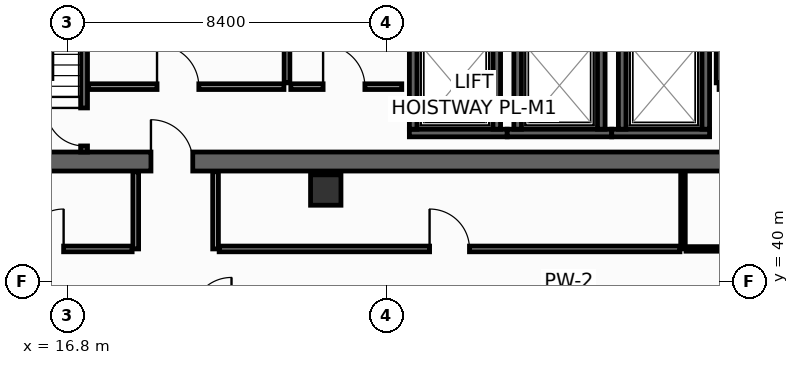
"""IFC4 building model, lengths in metres.
Left out: names, types, materials, properties, quantities, classifications, styles, units other than length and angle.
Written with IfcOpenShell. Run it as: python <this file> out.ifc"""

import sys

from ifc_helpers import new_model, si_unit, direction, frame, frame_2d, origin, origin_2d, place, context, subcontext, project, spatial, rectangle, hollow_rectangle, extrude, element, fill, save


model = new_model("IFC4")
c1 = context("Model", 3, precision=1e-05, world=origin(), true_north=direction((0.0, 1.0)))
c2 = subcontext(c1, "Body", "Model", "MODEL_VIEW")
j1 = project(units=[si_unit("LENGTHUNIT", "METRE"), si_unit("PLANEANGLEUNIT", "RADIAN")], contexts=[c1])
p1 = place(None, origin())
s1 = spatial("IfcSite", under=j1, at=p1, CompositionType="ELEMENT")
p2 = place(p1, origin())
s2 = spatial("IfcBuilding", under=s1, at=p2, CompositionType="ELEMENT")
p3 = place(p2, frame((0.0, 0.0, 205.6)))
s3 = spatial("IfcBuildingStorey", under=s2, at=p3, CompositionType="ELEMENT", Elevation=205.6)
p4 = place(p3, frame((13.6, 43.15, 0.0), z_axis=(0.0, 0.0, 1.0), x_axis=(1.0, 0.0, 0.0)))
e1 = element("IfcWall", 1, at=p4, inside=s3, PredefinedType="SHEAR", context=c2, shape_type="SweptSolid", body=[
    extrude(rectangle(XDim=32.7, YDim=0.5, at=frame_2d((16.35, 0.0))), origin(), (0.0, 0.0, 1.0), 3.55),
])
p5 = place(p4, frame((5.4, 0.0, 0.0)))
e2 = element("IfcOpeningElement", 2, at=p5, cuts=e1, PredefinedType="OPENING", context=c2, shape_type="SweptSolid", body=[
    extrude(rectangle(XDim=1.1, YDim=2.15, at=frame_2d((0.55, 1.075))), frame((0.0, 0.26, 0.0), z_axis=(0.0, -1.0, 0.0), x_axis=(1.0, 0.0, 0.0)), (0.0, 0.0, 1.0), 0.52),
])
p6 = place(p4, frame((25.6, 0.0, 0.0)))
e3 = element("IfcOpeningElement", 3, at=p6, cuts=e1, PredefinedType="OPENING", context=c2, shape_type="SweptSolid", body=[
    extrude(rectangle(XDim=1.1, YDim=2.15, at=frame_2d((0.55, 1.075))), frame((0.0, 0.26, 0.0), z_axis=(0.0, -1.0, 0.0), x_axis=(1.0, 0.0, 0.0)), (0.0, 0.0, 1.0), 0.52),
])
p7 = place(p3, frame((23.6, 42.4, 0.0), z_axis=(0.0, 0.0, 1.0), x_axis=(1.0, 0.0, 0.0)))
e4 = element("IfcColumn", 4, at=p7, inside=s3, PredefinedType="COLUMN", context=c2, shape_type="SweptSolid", body=[
    extrude(hollow_rectangle(XDim=0.8, YDim=0.8, WallThickness=0.036, at=origin_2d()), origin(), (0.0, 0.0, 1.0), 3.8),
])
p8 = place(p3, frame((25.8, 43.9, 0.0), z_axis=(0.0, 0.0, 1.0), x_axis=(1.0, 0.0, 0.0)))
e5 = element("IfcWall", 5, at=p8, inside=s3, PredefinedType="SHEAR", context=c2, shape_type="SweptSolid", body=[
    extrude(rectangle(XDim=2.575, YDim=0.2, at=frame_2d((1.288, 0.0))), origin(), (0.0, 0.0, 1.0), 3.55),
])
for number, where, z_axis, x_axis in (
    (6, (25.9, 44.0, 0.0), (0.0, 0.0, 1.0), (0.0, 1.0, 0.0)),
    (7, (28.1, 44.0, 0.0), (0.0, 0.0, 1.0), (0.0, 1.0, 0.0)),
):
    element("IfcWall", number, at=place(p3, frame(where, z_axis=z_axis, x_axis=x_axis)), inside=s3, PredefinedType="SHEAR", context=c2, shape_type="SweptSolid", body=[
        extrude(rectangle(XDim=2.3, YDim=0.2, at=frame_2d((1.15, 0.0))), origin(), (0.0, 0.0, 1.0), 3.55),
    ])
p9 = place(p3, frame((28.375, 43.9, 0.0), z_axis=(0.0, 0.0, 1.0), x_axis=(1.0, 0.0, 0.0)))
e8 = element("IfcWall", 8, at=p9, inside=s3, PredefinedType="SHEAR", context=c2, shape_type="SweptSolid", body=[
    extrude(rectangle(XDim=2.75, YDim=0.2, at=frame_2d((1.375, 0.0))), origin(), (0.0, 0.0, 1.0), 3.55),
])
for number, where, z_axis, x_axis in (
    (9, (28.65, 44.0, 0.0), (0.0, 0.0, 1.0), (0.0, 1.0, 0.0)),
    (10, (30.85, 44.0, 0.0), (0.0, 0.0, 1.0), (0.0, 1.0, 0.0)),
):
    element("IfcWall", number, at=place(p3, frame(where, z_axis=z_axis, x_axis=x_axis)), inside=s3, PredefinedType="SHEAR", context=c2, shape_type="SweptSolid", body=[
        extrude(rectangle(XDim=2.3, YDim=0.2, at=frame_2d((1.15, 0.0))), origin(), (0.0, 0.0, 1.0), 3.55),
    ])
p10 = place(p3, frame((31.125, 43.9, 0.0), z_axis=(0.0, 0.0, 1.0), x_axis=(1.0, 0.0, 0.0)))
e11 = element("IfcWall", 11, at=p10, inside=s3, PredefinedType="SHEAR", context=c2, shape_type="SweptSolid", body=[
    extrude(rectangle(XDim=2.575, YDim=0.2, at=frame_2d((1.288, 0.0))), origin(), (0.0, 0.0, 1.0), 3.55),
])
for number, where, z_axis, x_axis in (
    (12, (31.4, 44.0, 0.0), (0.0, 0.0, 1.0), (0.0, 1.0, 0.0)),
    (13, (33.6, 44.0, 0.0), (0.0, 0.0, 1.0), (0.0, 1.0, 0.0)),
):
    element("IfcWall", number, at=place(p3, frame(where, z_axis=z_axis, x_axis=x_axis)), inside=s3, PredefinedType="SHEAR", context=c2, shape_type="SweptSolid", body=[
        extrude(rectangle(XDim=2.3, YDim=0.2, at=frame_2d((1.15, 0.0))), origin(), (0.0, 0.0, 1.0), 3.55),
    ])
p11 = place(p3, frame((17.24, 43.4, 0.0), z_axis=(0.0, 0.0, 1.0), x_axis=(0.0, 1.0, 0.0)))
e14 = element("IfcWall", 14, at=p11, inside=s3, PredefinedType="SHEAR", context=c2, shape_type="SweptSolid", body=[
    extrude(rectangle(XDim=10.4, YDim=0.18, at=frame_2d((5.2, 0.0))), origin(), (0.0, 0.0, 1.0), 3.55),
])
p12 = place(p11, frame((0.16, 0.0, 0.0)))
e15 = element("IfcOpeningElement", 15, at=p12, cuts=e14, PredefinedType="OPENING", context=c2, shape_type="SweptSolid", body=[
    extrude(rectangle(XDim=1.0, YDim=2.15, at=frame_2d((0.5, 1.075))), frame((0.0, 0.1, 0.0), z_axis=(0.0, -1.0, 0.0), x_axis=(1.0, 0.0, 0.0)), (0.0, 0.0, 1.0), 0.2),
])
p13 = place(p3, frame((17.36, 45.12, 0.0), z_axis=(0.0, 0.0, 1.0), x_axis=(1.0, 0.0, 0.0)))
e16 = element("IfcWall", 16, at=p13, inside=s3, PredefinedType="PARTITIONING", context=c2, shape_type="SweptSolid", body=[
    extrude(rectangle(XDim=5.14, YDim=0.15, at=frame_2d((2.57, 0.0))), origin(), (0.0, 0.0, 1.0), 3.55),
])
p14 = place(p13, frame((1.8, 0.0, 0.0)))
e17 = element("IfcOpeningElement", 17, at=p14, cuts=e16, PredefinedType="OPENING", context=c2, shape_type="SweptSolid", body=[
    extrude(rectangle(XDim=1.1, YDim=2.15, at=frame_2d((0.55, 1.075))), frame((0.0, 0.085, 0.0), z_axis=(0.0, -1.0, 0.0), x_axis=(1.0, 0.0, 0.0)), (0.0, 0.0, 1.0), 0.17),
])
p15 = place(p3, frame((22.58, 50.55, 0.0), z_axis=(0.0, 0.0, 1.0), x_axis=(0.0, -1.0, 0.0)))
e18 = element("IfcWall", 18, at=p15, inside=s3, PredefinedType="PARTITIONING", context=c2, shape_type="SweptSolid", body=[
    extrude(rectangle(XDim=5.33, YDim=0.15, at=frame_2d((2.665, 0.0))), origin(), (0.0, 0.0, 1.0), 3.55),
])
p16 = place(p15, frame((1.8, 0.0, 0.0)))
e19 = element("IfcOpeningElement", 19, at=p16, cuts=e18, PredefinedType="OPENING", context=c2, shape_type="SweptSolid", body=[
    extrude(rectangle(XDim=1.1, YDim=2.15, at=frame_2d((0.55, 1.075))), frame((0.0, 0.085, 0.0), z_axis=(0.0, -1.0, 0.0), x_axis=(1.0, 0.0, 0.0)), (0.0, 0.0, 1.0), 0.17),
])
p17 = place(p3, frame((22.68, 45.12, 0.0), z_axis=(0.0, 0.0, 1.0), x_axis=(1.0, 0.0, 0.0)))
e20 = element("IfcWall", 20, at=p17, inside=s3, PredefinedType="PARTITIONING", context=c2, shape_type="SweptSolid", body=[
    extrude(rectangle(XDim=2.92, YDim=0.15, at=frame_2d((1.46, 0.0))), origin(), (0.0, 0.0, 1.0), 3.55),
])
p18 = place(p17, frame((0.85, 0.0, 0.0)))
e21 = element("IfcOpeningElement", 21, at=p18, cuts=e20, PredefinedType="OPENING", context=c2, shape_type="SweptSolid", body=[
    extrude(rectangle(XDim=1.1, YDim=2.15, at=frame_2d((0.55, 1.075))), frame((0.0, 0.085, 0.0), z_axis=(0.0, -1.0, 0.0), x_axis=(1.0, 0.0, 0.0)), (0.0, 0.0, 1.0), 0.17),
])
p19 = place(p3, frame((33.95, 45.12, 0.0), z_axis=(0.0, 0.0, 1.0), x_axis=(1.0, 0.0, 0.0)))
e22 = element("IfcWall", 22, at=p19, inside=s3, PredefinedType="PARTITIONING", context=c2, shape_type="SweptSolid", body=[
    extrude(rectangle(XDim=8.55, YDim=0.15, at=frame_2d((4.275, 0.0))), origin(), (0.0, 0.0, 1.0), 3.55),
])
p20 = place(p19, frame((0.95, 0.0, 0.0)))
e23 = element("IfcOpeningElement", 23, at=p20, cuts=e22, PredefinedType="OPENING", context=c2, shape_type="SweptSolid", body=[
    extrude(rectangle(XDim=0.95, YDim=2.15, at=frame_2d((0.475, 1.075))), frame((0.0, 0.085, 0.0), z_axis=(0.0, -1.0, 0.0), x_axis=(1.0, 0.0, 0.0)), (0.0, 0.0, 1.0), 0.17),
])
p21 = place(p19, frame((3.8, 0.0, 0.0)))
e24 = element("IfcOpeningElement", 24, at=p21, cuts=e22, PredefinedType="OPENING", context=c2, shape_type="SweptSolid", body=[
    extrude(rectangle(XDim=0.95, YDim=2.15, at=frame_2d((0.475, 1.075))), frame((0.0, 0.085, 0.0), z_axis=(0.0, -1.0, 0.0), x_axis=(1.0, 0.0, 0.0)), (0.0, 0.0, 1.0), 0.17),
])
p22 = place(p19, frame((6.65, 0.0, 0.0)))
e25 = element("IfcOpeningElement", 25, at=p22, cuts=e22, PredefinedType="OPENING", context=c2, shape_type="SweptSolid", body=[
    extrude(rectangle(XDim=0.95, YDim=2.15, at=frame_2d((0.475, 1.075))), frame((0.0, 0.085, 0.0), z_axis=(0.0, -1.0, 0.0), x_axis=(1.0, 0.0, 0.0)), (0.0, 0.0, 1.0), 0.17),
])
p23 = place(p3, frame((33.95, 45.22, 0.0), z_axis=(0.0, 0.0, 1.0), x_axis=(0.0, 1.0, 0.0)))
e26 = element("IfcWall", 26, at=p23, inside=s3, PredefinedType="PARTITIONING", context=c2, shape_type="SweptSolid", body=[
    extrude(rectangle(XDim=2.33, YDim=0.15, at=frame_2d((1.165, 0.0))), origin(), (0.0, 0.0, 1.0), 3.55),
])
for number, where, z_axis, x_axis in (
    (27, (18.6, 40.85, 0.0), (0.0, 0.0, 1.0), (0.0, 1.0, 0.0)),
    (28, (20.7, 40.85, 0.0), (0.0, 0.0, 1.0), (0.0, 1.0, 0.0)),
):
    element("IfcWall", number, at=place(p3, frame(where, z_axis=z_axis, x_axis=x_axis)), inside=s3, PredefinedType="PARTITIONING", context=c2, shape_type="SweptSolid", body=[
        extrude(rectangle(XDim=2.03, YDim=0.15, at=frame_2d((1.015, 0.0))), origin(), (0.0, 0.0, 1.0), 3.55),
    ])
p24 = place(p3, frame((13.85, 40.85, 0.0), z_axis=(0.0, 0.0, 1.0), x_axis=(1.0, 0.0, 0.0)))
e29 = element("IfcWall", 29, at=p24, inside=s3, PredefinedType="PARTITIONING", context=c2, shape_type="SweptSolid", body=[
    extrude(rectangle(XDim=4.655, YDim=0.15, at=frame_2d((2.327, 0.0))), origin(), (0.0, 0.0, 1.0), 3.55),
])
p25 = place(p24, frame((1.802, 0.0, 0.0)))
e30 = element("IfcOpeningElement", 30, at=p25, cuts=e29, PredefinedType="OPENING", context=c2, shape_type="SweptSolid", body=[
    extrude(rectangle(XDim=1.05, YDim=2.15, at=frame_2d((0.525, 1.075))), frame((0.0, 0.085, 0.0), z_axis=(0.0, -1.0, 0.0), x_axis=(1.0, 0.0, 0.0)), (0.0, 0.0, 1.0), 0.17),
])
p26 = place(p3, frame((33.0, 40.85, 0.0), z_axis=(0.0, 0.0, 1.0), x_axis=(0.0, 1.0, 0.0)))
e31 = element("IfcWall", 31, at=p26, inside=s3, PredefinedType="PARTITIONING", context=c2, shape_type="SweptSolid", body=[
    extrude(rectangle(XDim=2.03, YDim=0.12, at=frame_2d((1.015, 0.0))), origin(), (0.0, 0.0, 1.0), 2.835),
])
p27 = place(p3, frame((20.795, 40.85, 0.0), z_axis=(0.0, 0.0, 1.0), x_axis=(1.0, 0.0, 0.0)))
e32 = element("IfcWall", 32, at=p27, inside=s3, PredefinedType="PARTITIONING", context=c2, shape_type="SweptSolid", body=[
    extrude(rectangle(XDim=12.125, YDim=0.15, at=frame_2d((6.062, 0.0))), origin(), (0.0, 0.0, 1.0), 2.835),
])
p28 = place(p27, frame((5.537, 0.0, 0.0)))
e33 = element("IfcOpeningElement", 33, at=p28, cuts=e32, PredefinedType="OPENING", context=c2, shape_type="SweptSolid", body=[
    extrude(rectangle(XDim=1.05, YDim=2.15, at=frame_2d((0.525, 1.075))), frame((0.0, 0.085, 0.0), z_axis=(0.0, -1.0, 0.0), x_axis=(1.0, 0.0, 0.0)), (0.0, 0.0, 1.0), 0.17),
])
p29 = place(p3, frame((33.08, 40.85, 0.0), z_axis=(0.0, 0.0, 1.0), x_axis=(1.0, 0.0, 0.0)))
e34 = element("IfcWall", 34, at=p29, inside=s3, PredefinedType="PARTITIONING", context=c2, shape_type="SweptSolid", body=[
    extrude(rectangle(XDim=5.625, YDim=0.12, at=frame_2d((2.812, 0.0))), origin(), (0.0, 0.0, 1.0), 2.835),
])
p30 = place(p29, frame((1.702, 0.0, 0.0)))
e35 = element("IfcOpeningElement", 35, at=p30, cuts=e34, PredefinedType="OPENING", context=c2, shape_type="SweptSolid", body=[
    extrude(rectangle(XDim=0.9, YDim=2.1, at=frame_2d((0.45, 1.05))), frame((0.0, 0.07, 0.0), z_axis=(0.0, -1.0, 0.0), x_axis=(1.0, 0.0, 0.0)), (0.0, 0.0, 1.0), 0.14),
])
p31 = place(p12, origin())
e36 = element("IfcDoor", 36, at=p31, inside=s3, OperationType="SINGLE_SWING_RIGHT", PredefinedType="DOOR", context=c2, shape_type="SweptSolid", body=[
    extrude(rectangle(XDim=1.0, YDim=2.15, at=frame_2d((0.5, 1.075))), frame((0.0, 0.025, 0.0), z_axis=(0.0, -1.0, 0.0), x_axis=(1.0, 0.0, 0.0)), (0.0, 0.0, 1.0), 0.05),
])
fill(e15, e36)
p32 = place(p14, origin())
e37 = element("IfcDoor", 37, at=p32, inside=s3, OperationType="SINGLE_SWING_LEFT", PredefinedType="DOOR", context=c2, shape_type="SweptSolid", body=[
    extrude(rectangle(XDim=1.1, YDim=2.15, at=frame_2d((0.55, 1.075))), frame((0.0, 0.025, 0.0), z_axis=(0.0, -1.0, 0.0), x_axis=(1.0, 0.0, 0.0)), (0.0, 0.0, 1.0), 0.05),
])
fill(e17, e37)
p33 = place(p18, origin())
e38 = element("IfcDoor", 38, at=p33, inside=s3, OperationType="SINGLE_SWING_LEFT", PredefinedType="DOOR", context=c2, shape_type="SweptSolid", body=[
    extrude(rectangle(XDim=1.1, YDim=2.15, at=frame_2d((0.55, 1.075))), frame((0.0, 0.025, 0.0), z_axis=(0.0, -1.0, 0.0), x_axis=(1.0, 0.0, 0.0)), (0.0, 0.0, 1.0), 0.05),
])
fill(e21, e38)
p34 = place(p5, origin())
e39 = element("IfcDoor", 39, at=p34, inside=s3, OperationType="SINGLE_SWING_LEFT", PredefinedType="DOOR", context=c2, shape_type="SweptSolid", body=[
    extrude(rectangle(XDim=1.1, YDim=2.15, at=frame_2d((0.55, 1.075))), frame((0.0, 0.025, 0.0), z_axis=(0.0, -1.0, 0.0), x_axis=(1.0, 0.0, 0.0)), (0.0, 0.0, 1.0), 0.05),
])
fill(e2, e39)
p35 = place(p25, origin())
e40 = element("IfcDoor", 40, at=p35, inside=s3, OperationType="SINGLE_SWING_RIGHT", PredefinedType="DOOR", context=c2, shape_type="SweptSolid", body=[
    extrude(rectangle(XDim=1.05, YDim=2.15, at=frame_2d((0.525, 1.075))), frame((0.0, 0.025, 0.0), z_axis=(0.0, -1.0, 0.0), x_axis=(1.0, 0.0, 0.0)), (0.0, 0.0, 1.0), 0.05),
])
fill(e30, e40)
p36 = place(p28, origin())
e41 = element("IfcDoor", 41, at=p36, inside=s3, OperationType="SINGLE_SWING_LEFT", PredefinedType="DOOR", context=c2, shape_type="SweptSolid", body=[
    extrude(rectangle(XDim=1.05, YDim=2.15, at=frame_2d((0.525, 1.075))), frame((0.0, 0.025, 0.0), z_axis=(0.0, -1.0, 0.0), x_axis=(1.0, 0.0, 0.0)), (0.0, 0.0, 1.0), 0.05),
])
fill(e33, e41)
save(model, sys.argv[1])
